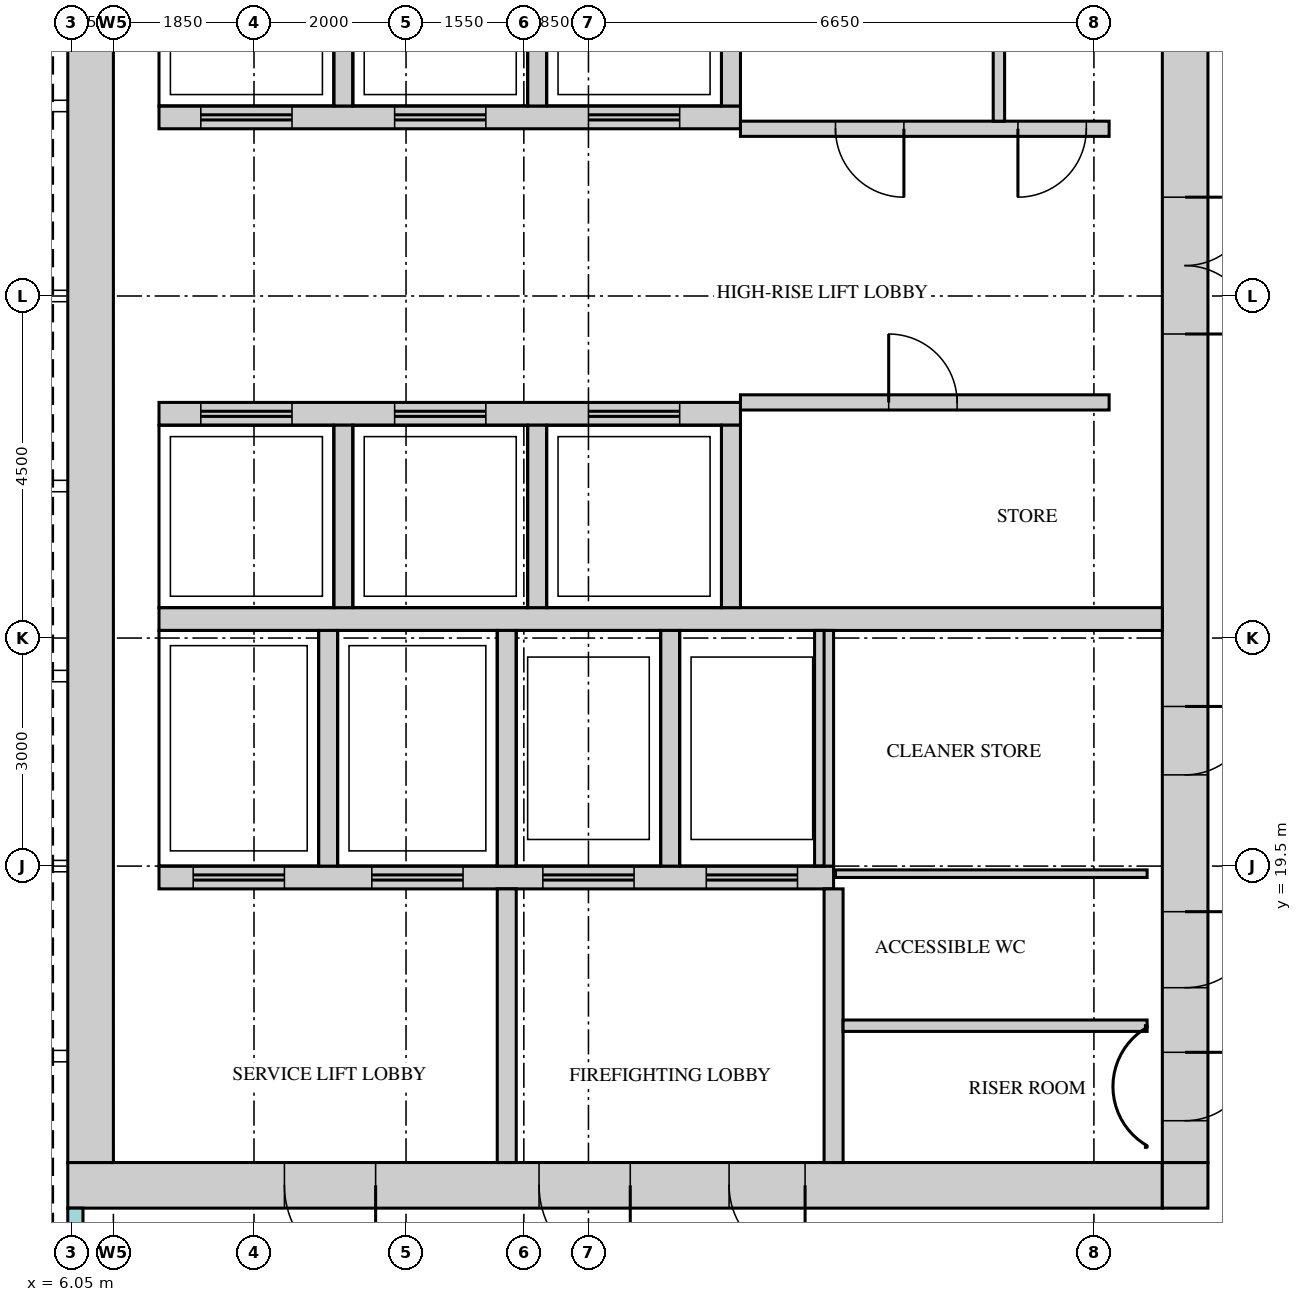
"""IFC4 building model, lengths in metres.
Left out: names, types, materials, properties, quantities, classifications, styles, units other than length and angle.
Written with IfcOpenShell. Run it as: python <this file> out.ifc"""

import sys

from ifc_helpers import new_model, si_unit, direction, frame, frame_2d, origin, place, context, subcontext, project, spatial, rectangle, extrude, source, transform, mapped, element, fill, save


model = new_model("IFC4")
c1 = context("Model", 3, precision=1e-05, world=origin(), true_north=direction((0.0, 1.0)))
c2 = subcontext(c1, "Body", "Model", "MODEL_VIEW")
j1 = project(units=[si_unit("LENGTHUNIT", "METRE"), si_unit("PLANEANGLEUNIT", "RADIAN")], contexts=[c1])
p1 = place(None, origin())
s1 = spatial("IfcSite", under=j1, at=p1, CompositionType="ELEMENT")
p2 = place(p1, origin())
s2 = spatial("IfcBuilding", under=s1, at=p2, CompositionType="ELEMENT")
p3 = place(p2, frame((0.0, 0.0, 282.2)))
s3 = spatial("IfcBuildingStorey", under=s2, at=p3, CompositionType="ELEMENT", Elevation=282.2)
m1 = source(origin(), c2, "Body", "SweptSolid", [
    extrude(rectangle(XDim=14.4, YDim=0.6, at=frame_2d((7.2, 0.0))), origin(), (0.0, 0.0, 1.0), 3.75),
])
p4 = place(p3, frame((6.0, 15.3, 0.0), z_axis=(0.0, 0.0, 1.0), x_axis=(1.0, 0.0, 0.0)))
e1 = element("IfcWall", 1, at=p4, inside=s3, PredefinedType="SHEAR", context=c2, shape_type="MappedRepresentation", body=[
    mapped(m1, transform((0.0, 0.0, 0.0))),
])
m2 = source(origin(), c2, "Body", "SweptSolid", [
    extrude(rectangle(XDim=1.2, YDim=2.1, at=frame_2d((0.6, 1.05))), frame((0.0, 0.31, 0.0), z_axis=(0.0, -1.0, 0.0), x_axis=(1.0, 0.0, 0.0)), (0.0, 0.0, 1.0), 0.62),
])
p5 = place(p4, frame((6.2, 0.0, 0.0)))
e2 = element("IfcOpeningElement", 2, at=p5, cuts=e1, PredefinedType="OPENING", context=c2, shape_type="MappedRepresentation", body=[
    mapped(m2, transform((0.0, 0.0, 0.0))),
])
p6 = place(p4, frame((2.85, 0.0, 0.0)))
e3 = element("IfcOpeningElement", 3, at=p6, cuts=e1, PredefinedType="OPENING", context=c2, shape_type="MappedRepresentation", body=[
    mapped(m2, transform((0.0, 0.0, 0.0))),
])
m3 = source(origin(), c2, "Body", "SweptSolid", [
    extrude(rectangle(XDim=1.0, YDim=2.1, at=frame_2d((0.5, 1.05))), frame((0.0, 0.31, 0.0), z_axis=(0.0, -1.0, 0.0), x_axis=(1.0, 0.0, 0.0)), (0.0, 0.0, 1.0), 0.62),
])
p7 = place(p4, frame((8.7, 0.0, 0.0)))
e4 = element("IfcOpeningElement", 4, at=p7, cuts=e1, PredefinedType="OPENING", context=c2, shape_type="MappedRepresentation", body=[
    mapped(m3, transform((0.0, 0.0, 0.0))),
])
m4 = source(origin(), c2, "Body", "SweptSolid", [
    extrude(rectangle(XDim=0.6, YDim=0.6, at=frame_2d((0.3, 0.0))), origin(), (0.0, 0.0, 1.0), 3.75),
])
p8 = place(p3, frame((20.4, 15.3, 0.0), z_axis=(0.0, 0.0, 1.0), x_axis=(1.0, 0.0, 0.0)))
e5 = element("IfcWall", 5, at=p8, inside=s3, PredefinedType="SHEAR", context=c2, shape_type="MappedRepresentation", body=[
    mapped(m4, transform((0.0, 0.0, 0.0))),
])
m5 = source(origin(), c2, "Body", "SweptSolid", [
    extrude(rectangle(XDim=22.8, YDim=0.6, at=frame_2d((11.4, 0.0))), origin(), (0.0, 0.0, 1.0), 3.75),
])
p9 = place(p3, frame((20.7, 15.6, 0.0), z_axis=(0.0, 0.0, 1.0), x_axis=(0.0, 1.0, 0.0)))
e6 = element("IfcWall", 6, at=p9, inside=s3, PredefinedType="SHEAR", context=c2, shape_type="MappedRepresentation", body=[
    mapped(m5, transform((0.0, 0.0, 0.0))),
])
m6 = source(origin(), c2, "Body", "SweptSolid", [
    extrude(rectangle(XDim=1.8, YDim=2.1, at=frame_2d((0.9, 1.05))), frame((0.0, 0.31, 0.0), z_axis=(0.0, -1.0, 0.0), x_axis=(1.0, 0.0, 0.0)), (0.0, 0.0, 1.0), 0.62),
])
p10 = place(p9, frame((10.9, 0.0, 0.0)))
e7 = element("IfcOpeningElement", 7, at=p10, cuts=e6, PredefinedType="OPENING", context=c2, shape_type="MappedRepresentation", body=[
    mapped(m6, transform((0.0, 0.0, 0.0))),
])
m7 = source(origin(), c2, "Body", "SweptSolid", [
    extrude(rectangle(XDim=0.9, YDim=2.1, at=frame_2d((0.45, 1.05))), frame((0.0, 0.31, 0.0), z_axis=(0.0, -1.0, 0.0), x_axis=(1.0, 0.0, 0.0)), (0.0, 0.0, 1.0), 0.62),
])
p11 = place(p9, frame((0.55, 0.0, 0.0)))
e8 = element("IfcOpeningElement", 8, at=p11, cuts=e6, PredefinedType="OPENING", context=c2, shape_type="MappedRepresentation", body=[
    mapped(m7, transform((0.0, 0.0, 0.0))),
])
p12 = place(p9, frame((2.3, 0.0, 0.0)))
e9 = element("IfcOpeningElement", 9, at=p12, cuts=e6, PredefinedType="OPENING", context=c2, shape_type="MappedRepresentation", body=[
    mapped(m3, transform((0.0, 0.0, 0.0))),
])
p13 = place(p9, frame((5.1, 0.0, 0.0)))
e10 = element("IfcOpeningElement", 10, at=p13, cuts=e6, PredefinedType="OPENING", context=c2, shape_type="MappedRepresentation", body=[
    mapped(m7, transform((0.0, 0.0, 0.0))),
])
p14 = place(p3, frame((6.3, 15.6, 0.0), z_axis=(0.0, 0.0, 1.0), x_axis=(0.0, 1.0, 0.0)))
e11 = element("IfcWall", 11, at=p14, inside=s3, PredefinedType="SHEAR", context=c2, shape_type="MappedRepresentation", body=[
    mapped(m5, transform((0.0, 0.0, 0.0))),
])
m8 = source(origin(), c2, "Body", "SweptSolid", [
    extrude(rectangle(XDim=13.2, YDim=0.3, at=frame_2d((6.6, 0.0))), origin(), (0.0, 0.0, 1.0), 3.75),
])
p15 = place(p3, frame((7.2, 22.75, 0.0), z_axis=(0.0, 0.0, 1.0), x_axis=(1.0, 0.0, 0.0)))
e12 = element("IfcWall", 12, at=p15, inside=s3, PredefinedType="STANDARD", context=c2, shape_type="MappedRepresentation", body=[
    mapped(m8, transform((0.0, 0.0, 0.0))),
])
m9 = source(origin(), c2, "Body", "SweptSolid", [
    extrude(rectangle(XDim=8.875, YDim=0.3, at=frame_2d((4.438, 0.0))), origin(), (0.0, 0.0, 1.0), 3.75),
])
p16 = place(p3, frame((7.2, 19.35, 0.0), z_axis=(0.0, 0.0, 1.0), x_axis=(1.0, 0.0, 0.0)))
e13 = element("IfcWall", 13, at=p16, inside=s3, PredefinedType="STANDARD", context=c2, shape_type="MappedRepresentation", body=[
    mapped(m9, transform((0.0, 0.0, 0.0))),
])
m10 = source(origin(), c2, "Body", "SweptSolid", [
    extrude(rectangle(XDim=1.2, YDim=2.1, at=frame_2d((0.6, 1.05))), frame((0.0, 0.16, 0.0), z_axis=(0.0, -1.0, 0.0), x_axis=(1.0, 0.0, 0.0)), (0.0, 0.0, 1.0), 0.32),
])
p17 = place(p16, frame((0.45, 0.0, 0.0)))
e14 = element("IfcOpeningElement", 14, at=p17, cuts=e13, PredefinedType="OPENING", context=c2, shape_type="MappedRepresentation", body=[
    mapped(m10, transform((0.0, 0.0, 0.0))),
])
p18 = place(p16, frame((2.8, 0.0, 0.0)))
e15 = element("IfcOpeningElement", 15, at=p18, cuts=e13, PredefinedType="OPENING", context=c2, shape_type="MappedRepresentation", body=[
    mapped(m10, transform((0.0, 0.0, 0.0))),
])
p19 = place(p16, frame((5.05, 0.0, 0.0)))
e16 = element("IfcOpeningElement", 16, at=p19, cuts=e13, PredefinedType="OPENING", context=c2, shape_type="MappedRepresentation", body=[
    mapped(m10, transform((0.0, 0.0, 0.0))),
])
p20 = place(p16, frame((7.2, 0.0, 0.0)))
e17 = element("IfcOpeningElement", 17, at=p20, cuts=e13, PredefinedType="OPENING", context=c2, shape_type="MappedRepresentation", body=[
    mapped(m10, transform((0.0, 0.0, 0.0))),
])
m11 = source(origin(), c2, "Body", "SweptSolid", [
    extrude(rectangle(XDim=7.65, YDim=0.3, at=frame_2d((3.825, 0.0))), origin(), (0.0, 0.0, 1.0), 3.75),
])
p21 = place(p3, frame((7.2, 29.35, 0.0), z_axis=(0.0, 0.0, 1.0), x_axis=(1.0, 0.0, 0.0)))
e18 = element("IfcWall", 18, at=p21, inside=s3, PredefinedType="STANDARD", context=c2, shape_type="MappedRepresentation", body=[
    mapped(m11, transform((0.0, 0.0, 0.0))),
])
p22 = place(p21, frame((0.55, 0.0, 0.0)))
e19 = element("IfcOpeningElement", 19, at=p22, cuts=e18, PredefinedType="OPENING", context=c2, shape_type="MappedRepresentation", body=[
    mapped(m10, transform((0.0, 0.0, 0.0))),
])
p23 = place(p21, frame((3.1, 0.0, 0.0)))
e20 = element("IfcOpeningElement", 20, at=p23, cuts=e18, PredefinedType="OPENING", context=c2, shape_type="MappedRepresentation", body=[
    mapped(m10, transform((0.0, 0.0, 0.0))),
])
p24 = place(p21, frame((5.65, 0.0, 0.0)))
e21 = element("IfcOpeningElement", 21, at=p24, cuts=e18, PredefinedType="OPENING", context=c2, shape_type="MappedRepresentation", body=[
    mapped(m10, transform((0.0, 0.0, 0.0))),
])
p25 = place(p3, frame((7.2, 25.45, 0.0), z_axis=(0.0, 0.0, 1.0), x_axis=(1.0, 0.0, 0.0)))
e22 = element("IfcWall", 22, at=p25, inside=s3, PredefinedType="STANDARD", context=c2, shape_type="MappedRepresentation", body=[
    mapped(m11, transform((0.0, 0.0, 0.0))),
])
p26 = place(p25, frame((0.55, 0.0, 0.0)))
e23 = element("IfcOpeningElement", 23, at=p26, cuts=e22, PredefinedType="OPENING", context=c2, shape_type="MappedRepresentation", body=[
    mapped(m10, transform((0.0, 0.0, 0.0))),
])
p27 = place(p25, frame((3.1, 0.0, 0.0)))
e24 = element("IfcOpeningElement", 24, at=p27, cuts=e22, PredefinedType="OPENING", context=c2, shape_type="MappedRepresentation", body=[
    mapped(m10, transform((0.0, 0.0, 0.0))),
])
p28 = place(p25, frame((5.65, 0.0, 0.0)))
e25 = element("IfcOpeningElement", 25, at=p28, cuts=e22, PredefinedType="OPENING", context=c2, shape_type="MappedRepresentation", body=[
    mapped(m10, transform((0.0, 0.0, 0.0))),
])
m12 = source(origin(), c2, "Body", "SweptSolid", [
    extrude(rectangle(XDim=3.1, YDim=0.25, at=frame_2d((1.55, 0.0))), origin(), (0.0, 0.0, 1.0), 3.75),
])
for number, where, z_axis, x_axis in (
    (26, (9.425, 19.5, 0.0), (0.0, 0.0, 1.0), (0.0, 1.0, 0.0)),
    (27, (11.775, 19.5, 0.0), (0.0, 0.0, 1.0), (0.0, 1.0, 0.0)),
    (28, (13.925, 19.5, 0.0), (0.0, 0.0, 1.0), (0.0, 1.0, 0.0)),
    (29, (15.95, 19.5, 0.0), (0.0, 0.0, 1.0), (0.0, 1.0, 0.0)),
):
    element("IfcWall", number, at=place(p3, frame(where, z_axis=z_axis, x_axis=x_axis)), inside=s3, PredefinedType="STANDARD", context=c2, shape_type="MappedRepresentation", body=[
        mapped(m12, transform((0.0, 0.0, 0.0))),
    ])
m13 = source(origin(), c2, "Body", "SweptSolid", [
    extrude(rectangle(XDim=2.4, YDim=0.25, at=frame_2d((1.2, 0.0))), origin(), (0.0, 0.0, 1.0), 3.75),
])
for number, where, z_axis, x_axis in (
    (30, (9.625, 29.5, 0.0), (0.0, 0.0, 1.0), (0.0, 1.0, 0.0)),
    (31, (12.175, 29.5, 0.0), (0.0, 0.0, 1.0), (0.0, 1.0, 0.0)),
    (32, (14.725, 29.5, 0.0), (0.0, 0.0, 1.0), (0.0, 1.0, 0.0)),
):
    element("IfcWall", number, at=place(p3, frame(where, z_axis=z_axis, x_axis=x_axis)), inside=s3, PredefinedType="STANDARD", context=c2, shape_type="MappedRepresentation", body=[
        mapped(m13, transform((0.0, 0.0, 0.0))),
    ])
m14 = source(origin(), c2, "Body", "SweptSolid", [
    extrude(rectangle(XDim=2.4, YDim=0.25, at=frame_2d((1.2, 0.0))), origin(), (0.0, 0.0, 1.0), 3.75),
])
for number, where, z_axis, x_axis in (
    (33, (9.625, 22.9, 0.0), (0.0, 0.0, 1.0), (0.0, 1.0, 0.0)),
    (34, (12.175, 22.9, 0.0), (0.0, 0.0, 1.0), (0.0, 1.0, 0.0)),
    (35, (14.725, 22.9, 0.0), (0.0, 0.0, 1.0), (0.0, 1.0, 0.0)),
):
    element("IfcWall", number, at=place(p3, frame(where, z_axis=z_axis, x_axis=x_axis)), inside=s3, PredefinedType="STANDARD", context=c2, shape_type="MappedRepresentation", body=[
        mapped(m14, transform((0.0, 0.0, 0.0))),
    ])
m15 = source(origin(), c2, "Body", "SweptSolid", [
    extrude(rectangle(XDim=3.6, YDim=0.25, at=frame_2d((1.8, 0.0))), origin(), (0.0, 0.0, 1.0), 3.75),
])
for number, where, z_axis, x_axis in (
    (36, (16.075, 15.6, 0.0), (0.0, 0.0, 1.0), (0.0, 1.0, 0.0)),
    (37, (11.775, 15.6, 0.0), (0.0, 0.0, 1.0), (0.0, 1.0, 0.0)),
):
    element("IfcWall", number, at=place(p3, frame(where, z_axis=z_axis, x_axis=x_axis)), inside=s3, PredefinedType="STANDARD", context=c2, shape_type="MappedRepresentation", body=[
        mapped(m15, transform((0.0, 0.0, 0.0))),
    ])
m16 = source(origin(), c2, "Body", "SweptSolid", [
    extrude(rectangle(XDim=4.0, YDim=0.15, at=frame_2d((2.0, 0.0))), origin(), (0.0, 0.0, 1.0), 3.8),
])
p29 = place(p3, frame((16.2, 17.4, 0.0), z_axis=(0.0, 0.0, 1.0), x_axis=(1.0, 0.0, 0.0)))
e38 = element("IfcWall", 38, at=p29, inside=s3, PredefinedType="PARTITIONING", context=c2, shape_type="MappedRepresentation", body=[
    mapped(m16, transform((0.0, 0.0, 0.0))),
])
m17 = source(origin(), c2, "Body", "SweptSolid", [
    extrude(rectangle(XDim=4.1, YDim=0.1, at=frame_2d((2.05, 0.0))), origin(), (0.0, 0.0, 1.0), 3.8),
])
p30 = place(p3, frame((16.1, 19.4, 0.0), z_axis=(0.0, 0.0, 1.0), x_axis=(1.0, 0.0, 0.0)))
e39 = element("IfcWall", 39, at=p30, inside=s3, PredefinedType="PARTITIONING", context=c2, shape_type="MappedRepresentation", body=[
    mapped(m17, transform((0.0, 0.0, 0.0))),
])
m18 = source(origin(), c2, "Body", "SweptSolid", [
    extrude(rectangle(XDim=4.85, YDim=0.2, at=frame_2d((2.425, 0.0))), origin(), (0.0, 0.0, 1.0), 3.8),
])
p31 = place(p3, frame((14.85, 25.6, 0.0), z_axis=(0.0, 0.0, 1.0), x_axis=(1.0, 0.0, 0.0)))
e40 = element("IfcWall", 40, at=p31, inside=s3, PredefinedType="PARTITIONING", context=c2, shape_type="MappedRepresentation", body=[
    mapped(m18, transform((0.0, 0.0, 0.0))),
])
m19 = source(origin(), c2, "Body", "SweptSolid", [
    extrude(rectangle(XDim=0.9, YDim=2.1, at=frame_2d((0.45, 1.05))), frame((0.0, 0.11, 0.0), z_axis=(0.0, -1.0, 0.0), x_axis=(1.0, 0.0, 0.0)), (0.0, 0.0, 1.0), 0.22),
])
p32 = place(p31, frame((1.95, 0.0, 0.0)))
e41 = element("IfcOpeningElement", 41, at=p32, cuts=e40, PredefinedType="OPENING", context=c2, shape_type="MappedRepresentation", body=[
    mapped(m19, transform((0.0, 0.0, 0.0))),
])
p33 = place(p3, frame((14.85, 29.2, 0.0), z_axis=(0.0, 0.0, 1.0), x_axis=(1.0, 0.0, 0.0)))
e42 = element("IfcWall", 42, at=p33, inside=s3, PredefinedType="PARTITIONING", context=c2, shape_type="MappedRepresentation", body=[
    mapped(m18, transform((0.0, 0.0, 0.0))),
])
p34 = place(p33, frame((1.25, 0.0, 0.0)))
e43 = element("IfcOpeningElement", 43, at=p34, cuts=e42, PredefinedType="OPENING", context=c2, shape_type="MappedRepresentation", body=[
    mapped(m19, transform((0.0, 0.0, 0.0))),
])
p35 = place(p33, frame((3.65, 0.0, 0.0)))
e44 = element("IfcOpeningElement", 44, at=p35, cuts=e42, PredefinedType="OPENING", context=c2, shape_type="MappedRepresentation", body=[
    mapped(m19, transform((0.0, 0.0, 0.0))),
])
m20 = source(origin(), c2, "Body", "SweptSolid", [
    extrude(rectangle(XDim=2.8, YDim=0.15, at=frame_2d((1.4, 0.0))), origin(), (0.0, 0.0, 1.0), 3.8),
])
p36 = place(p3, frame((18.25, 29.3, 0.0), z_axis=(0.0, 0.0, 1.0), x_axis=(0.0, 1.0, 0.0)))
e45 = element("IfcWall", 45, at=p36, inside=s3, PredefinedType="PARTITIONING", context=c2, shape_type="MappedRepresentation", body=[
    mapped(m20, transform((0.0, 0.0, 0.0))),
])
m21 = source(origin(), c2, "Body", "SweptSolid", [
    extrude(rectangle(XDim=0.9, YDim=2.1, at=frame_2d((0.45, 1.05))), frame((0.0, 0.025, 0.0), z_axis=(0.0, -1.0, 0.0), x_axis=(1.0, 0.0, 0.0)), (0.0, 0.0, 1.0), 0.05),
])
p37 = place(p32, origin())
e46 = element("IfcDoor", 46, at=p37, inside=s3, OperationType="SINGLE_SWING_RIGHT", PredefinedType="DOOR", context=c2, shape_type="MappedRepresentation", body=[
    mapped(m21, transform((0.0, 0.0, 0.0))),
])
fill(e41, e46)
p38 = place(p34, origin())
e47 = element("IfcDoor", 47, at=p38, inside=s3, OperationType="SINGLE_SWING_RIGHT", PredefinedType="DOOR", context=c2, shape_type="MappedRepresentation", body=[
    mapped(m21, transform((0.0, 0.0, 0.0))),
])
fill(e43, e47)
p39 = place(p35, origin())
e48 = element("IfcDoor", 48, at=p39, inside=s3, OperationType="SINGLE_SWING_LEFT", PredefinedType="DOOR", context=c2, shape_type="MappedRepresentation", body=[
    mapped(m21, transform((0.0, 0.0, 0.0))),
])
fill(e44, e48)
m22 = source(origin(), c2, "Body", "SweptSolid", [
    extrude(rectangle(XDim=1.8, YDim=2.1, at=frame_2d((0.9, 1.05))), frame((0.0, 0.25, 0.0), z_axis=(0.0, -1.0, 0.0), x_axis=(1.0, 0.0, 0.0)), (0.0, 0.0, 1.0), 0.5),
])
p40 = place(p10, origin())
e49 = element("IfcDoor", 49, at=p40, inside=s3, OperationType="DOUBLE_DOOR_SINGLE_SWING", PredefinedType="DOOR", context=c2, shape_type="MappedRepresentation", body=[
    mapped(m22, transform((0.0, 0.0, 0.0))),
])
fill(e7, e49)
m23 = source(origin(), c2, "Body", "SweptSolid", [
    extrude(rectangle(XDim=0.9, YDim=2.1, at=frame_2d((0.45, 1.05))), frame((0.0, 0.25, 0.0), z_axis=(0.0, -1.0, 0.0), x_axis=(1.0, 0.0, 0.0)), (0.0, 0.0, 1.0), 0.5),
])
p41 = place(p11, origin())
e50 = element("IfcDoor", 50, at=p41, inside=s3, OperationType="SINGLE_SWING_RIGHT", PredefinedType="DOOR", context=c2, shape_type="MappedRepresentation", body=[
    mapped(m23, transform((0.0, 0.0, 0.0))),
])
fill(e8, e50)
m24 = source(origin(), c2, "Body", "SweptSolid", [
    extrude(rectangle(XDim=1.0, YDim=2.1, at=frame_2d((0.5, 1.05))), frame((0.0, 0.25, 0.0), z_axis=(0.0, -1.0, 0.0), x_axis=(1.0, 0.0, 0.0)), (0.0, 0.0, 1.0), 0.5),
])
p42 = place(p12, origin())
e51 = element("IfcDoor", 51, at=p42, inside=s3, OperationType="SINGLE_SWING_RIGHT", PredefinedType="DOOR", context=c2, shape_type="MappedRepresentation", body=[
    mapped(m24, transform((0.0, 0.0, 0.0))),
])
fill(e9, e51)
p43 = place(p13, origin())
e52 = element("IfcDoor", 52, at=p43, inside=s3, OperationType="SINGLE_SWING_RIGHT", PredefinedType="DOOR", context=c2, shape_type="MappedRepresentation", body=[
    mapped(m23, transform((0.0, 0.0, 0.0))),
])
fill(e10, e52)
m25 = source(origin(), c2, "Body", "SweptSolid", [
    extrude(rectangle(XDim=1.2, YDim=2.1, at=frame_2d((0.6, 1.05))), frame((0.0, 0.25, 0.0), z_axis=(0.0, -1.0, 0.0), x_axis=(1.0, 0.0, 0.0)), (0.0, 0.0, 1.0), 0.5),
])
p44 = place(p5, origin())
e53 = element("IfcDoor", 53, at=p44, inside=s3, OperationType="SINGLE_SWING_RIGHT", PredefinedType="DOOR", context=c2, shape_type="MappedRepresentation", body=[
    mapped(m25, transform((0.0, 0.0, 0.0))),
])
fill(e2, e53)
p45 = place(p6, origin())
e54 = element("IfcDoor", 54, at=p45, inside=s3, OperationType="SINGLE_SWING_RIGHT", PredefinedType="DOOR", context=c2, shape_type="MappedRepresentation", body=[
    mapped(m25, transform((0.0, 0.0, 0.0))),
])
fill(e3, e54)
p46 = place(p7, origin())
e55 = element("IfcDoor", 55, at=p46, inside=s3, OperationType="SINGLE_SWING_RIGHT", PredefinedType="DOOR", context=c2, shape_type="MappedRepresentation", body=[
    mapped(m24, transform((0.0, 0.0, 0.0))),
])
fill(e4, e55)
m26 = source(origin(), c2, "Body", "SweptSolid", [
    extrude(rectangle(XDim=1.2, YDim=2.1, at=frame_2d((0.6, 1.05))), frame((0.0, 0.025, 0.0), z_axis=(0.0, -1.0, 0.0), x_axis=(1.0, 0.0, 0.0)), (0.0, 0.0, 1.0), 0.05),
])
p47 = place(p26, origin())
e56 = element("IfcDoor", 56, at=p47, inside=s3, OperationType="DOUBLE_DOOR_SLIDING", PredefinedType="DOOR", context=c2, shape_type="MappedRepresentation", body=[
    mapped(m26, transform((0.0, 0.0, 0.0))),
])
fill(e23, e56)
p48 = place(p27, origin())
e57 = element("IfcDoor", 57, at=p48, inside=s3, OperationType="DOUBLE_DOOR_SLIDING", PredefinedType="DOOR", context=c2, shape_type="MappedRepresentation", body=[
    mapped(m26, transform((0.0, 0.0, 0.0))),
])
fill(e24, e57)
p49 = place(p28, origin())
e58 = element("IfcDoor", 58, at=p49, inside=s3, OperationType="DOUBLE_DOOR_SLIDING", PredefinedType="DOOR", context=c2, shape_type="MappedRepresentation", body=[
    mapped(m26, transform((0.0, 0.0, 0.0))),
])
fill(e25, e58)
p50 = place(p22, origin())
e59 = element("IfcDoor", 59, at=p50, inside=s3, OperationType="DOUBLE_DOOR_SLIDING", PredefinedType="DOOR", context=c2, shape_type="MappedRepresentation", body=[
    mapped(m26, transform((0.0, 0.0, 0.0))),
])
fill(e19, e59)
p51 = place(p23, origin())
e60 = element("IfcDoor", 60, at=p51, inside=s3, OperationType="DOUBLE_DOOR_SLIDING", PredefinedType="DOOR", context=c2, shape_type="MappedRepresentation", body=[
    mapped(m26, transform((0.0, 0.0, 0.0))),
])
fill(e20, e60)
p52 = place(p24, origin())
e61 = element("IfcDoor", 61, at=p52, inside=s3, OperationType="DOUBLE_DOOR_SLIDING", PredefinedType="DOOR", context=c2, shape_type="MappedRepresentation", body=[
    mapped(m26, transform((0.0, 0.0, 0.0))),
])
fill(e21, e61)
p53 = place(p17, origin())
e62 = element("IfcDoor", 62, at=p53, inside=s3, OperationType="DOUBLE_DOOR_SLIDING", PredefinedType="DOOR", context=c2, shape_type="MappedRepresentation", body=[
    mapped(m26, transform((0.0, 0.0, 0.0))),
])
fill(e14, e62)
p54 = place(p18, origin())
e63 = element("IfcDoor", 63, at=p54, inside=s3, OperationType="DOUBLE_DOOR_SLIDING", PredefinedType="DOOR", context=c2, shape_type="MappedRepresentation", body=[
    mapped(m26, transform((0.0, 0.0, 0.0))),
])
fill(e15, e63)
p55 = place(p19, origin())
e64 = element("IfcDoor", 64, at=p55, inside=s3, OperationType="DOUBLE_DOOR_SLIDING", PredefinedType="DOOR", context=c2, shape_type="MappedRepresentation", body=[
    mapped(m26, transform((0.0, 0.0, 0.0))),
])
fill(e16, e64)
p56 = place(p20, origin())
e65 = element("IfcDoor", 65, at=p56, inside=s3, OperationType="DOUBLE_DOOR_SLIDING", PredefinedType="DOOR", context=c2, shape_type="MappedRepresentation", body=[
    mapped(m26, transform((0.0, 0.0, 0.0))),
])
fill(e17, e65)
save(model, sys.argv[1])
